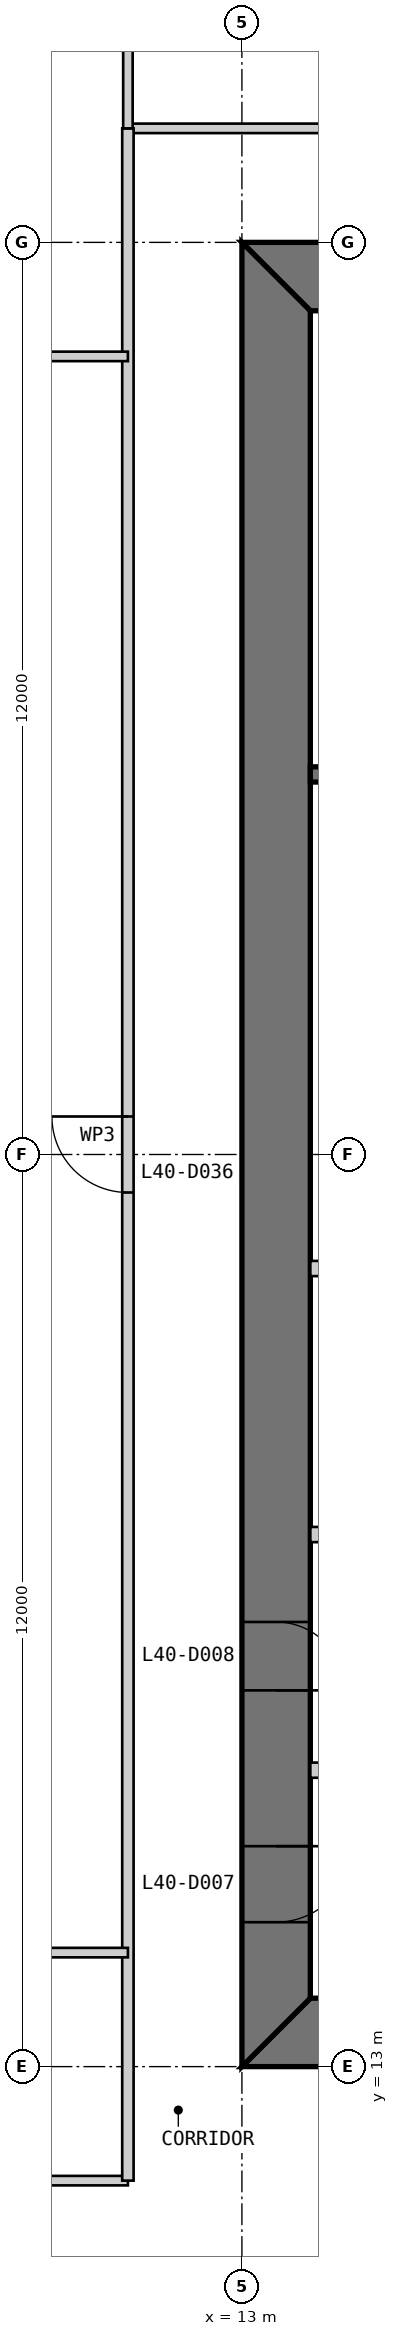
"""IFC4 building model, lengths in metres.
Left out: names, types, materials, properties, quantities, classifications, styles, units other than length and angle.
Written with IfcOpenShell. Run it as: python <this file> out.ifc"""

import sys

from ifc_helpers import new_model, si_unit, direction, frame, frame_2d, origin, place, context, subcontext, project, spatial, polyline, rectangle, outline, extrude, element, fill, save


model = new_model("IFC4")
c1 = context("Model", 3, precision=1e-05, world=origin(), true_north=direction((0.0, 1.0)))
c2 = subcontext(c1, "Body", "Model", "MODEL_VIEW")
j1 = project(units=[si_unit("LENGTHUNIT", "METRE"), si_unit("PLANEANGLEUNIT", "RADIAN")], contexts=[c1])
p1 = place(None, origin())
s1 = spatial("IfcSite", under=j1, at=p1, CompositionType="ELEMENT")
p2 = place(p1, origin())
s2 = spatial("IfcBuilding", under=s1, at=p2, CompositionType="ELEMENT")
p3 = place(p2, frame((0.0, 0.0, 173.8)))
s3 = spatial("IfcBuildingStorey", under=s2, at=p3, CompositionType="ELEMENT", Elevation=173.8)
p4 = place(p3, frame((13.0, 13.45, 0.0), z_axis=(0.0, 0.0, 1.0), x_axis=(1.0, 0.0, 0.0)))
e1 = element("IfcWall", 1, at=p4, inside=s3, PredefinedType="SHEAR", context=c2, shape_type="SweptSolid", body=[
    extrude(outline(polyline([(0.0, -0.45), (24.0, -0.45), (23.1, 0.45), (0.9, 0.45), (0.0, -0.45)])), origin(), (0.0, 0.0, 1.0), 4.0),
])
p5 = place(p4, frame((4.9, 0.0, 0.0)))
e2 = element("IfcOpeningElement", 2, at=p5, cuts=e1, PredefinedType="OPENING", context=c2, shape_type="SweptSolid", body=[
    extrude(rectangle(XDim=1.0, YDim=2.2, at=frame_2d((0.5, 1.1))), frame((0.0, 0.46, 0.0), z_axis=(0.0, -1.0, 0.0), x_axis=(1.0, 0.0, 0.0)), (0.0, 0.0, 1.0), 0.92),
])
p6 = place(p4, frame((8.9, 0.0, 0.0)))
e3 = element("IfcOpeningElement", 3, at=p6, cuts=e1, PredefinedType="OPENING", context=c2, shape_type="SweptSolid", body=[
    extrude(rectangle(XDim=1.1, YDim=2.2, at=frame_2d((0.55, 1.1))), frame((0.0, 0.46, 0.0), z_axis=(0.0, -1.0, 0.0), x_axis=(1.0, 0.0, 0.0)), (0.0, 0.0, 1.0), 0.92),
])
p7 = place(p4, frame((15.05, 0.0, 0.0)))
e4 = element("IfcOpeningElement", 4, at=p7, cuts=e1, PredefinedType="OPENING", context=c2, shape_type="SweptSolid", body=[
    extrude(rectangle(XDim=0.9, YDim=2.2, at=frame_2d((0.45, 1.1))), frame((0.0, 0.46, 0.0), z_axis=(0.0, -1.0, 0.0), x_axis=(1.0, 0.0, 0.0)), (0.0, 0.0, 1.0), 0.92),
])
p8 = place(p4, frame((17.9, 0.0, 0.0)))
e5 = element("IfcOpeningElement", 5, at=p8, cuts=e1, PredefinedType="OPENING", context=c2, shape_type="SweptSolid", body=[
    extrude(rectangle(XDim=1.0, YDim=2.2, at=frame_2d((0.5, 1.1))), frame((0.0, 0.46, 0.0), z_axis=(0.0, -1.0, 0.0), x_axis=(1.0, 0.0, 0.0)), (0.0, 0.0, 1.0), 0.92),
])
p9 = place(p4, frame((21.4, 0.0, 0.0)))
e6 = element("IfcOpeningElement", 6, at=p9, cuts=e1, PredefinedType="OPENING", context=c2, shape_type="SweptSolid", body=[
    extrude(rectangle(XDim=1.0, YDim=2.2, at=frame_2d((0.5, 1.1))), frame((0.0, 0.46, 0.0), z_axis=(0.0, -1.0, 0.0), x_axis=(1.0, 0.0, 0.0)), (0.0, 0.0, 1.0), 0.92),
])
p10 = place(p3, frame((37.0, 36.55, 0.0), z_axis=(0.0, 0.0, 1.0), x_axis=(-1.0, 0.0, 0.0)))
e7 = element("IfcWall", 7, at=p10, inside=s3, PredefinedType="SHEAR", context=c2, shape_type="SweptSolid", body=[
    extrude(outline(polyline([(0.0, -0.45), (24.0, -0.45), (23.1, 0.45), (0.9, 0.45), (0.0, -0.45)])), origin(), (0.0, 0.0, 1.0), 4.0),
])
p11 = place(p10, frame((4.9, 0.0, 0.0)))
e8 = element("IfcOpeningElement", 8, at=p11, cuts=e7, PredefinedType="OPENING", context=c2, shape_type="SweptSolid", body=[
    extrude(rectangle(XDim=1.0, YDim=2.2, at=frame_2d((0.5, 1.1))), frame((0.0, 0.46, 0.0), z_axis=(0.0, -1.0, 0.0), x_axis=(1.0, 0.0, 0.0)), (0.0, 0.0, 1.0), 0.92),
])
p12 = place(p10, frame((8.9, 0.0, 0.0)))
e9 = element("IfcOpeningElement", 9, at=p12, cuts=e7, PredefinedType="OPENING", context=c2, shape_type="SweptSolid", body=[
    extrude(rectangle(XDim=1.1, YDim=2.2, at=frame_2d((0.55, 1.1))), frame((0.0, 0.46, 0.0), z_axis=(0.0, -1.0, 0.0), x_axis=(1.0, 0.0, 0.0)), (0.0, 0.0, 1.0), 0.92),
])
p13 = place(p10, frame((15.05, 0.0, 0.0)))
e10 = element("IfcOpeningElement", 10, at=p13, cuts=e7, PredefinedType="OPENING", context=c2, shape_type="SweptSolid", body=[
    extrude(rectangle(XDim=0.9, YDim=2.2, at=frame_2d((0.45, 1.1))), frame((0.0, 0.46, 0.0), z_axis=(0.0, -1.0, 0.0), x_axis=(1.0, 0.0, 0.0)), (0.0, 0.0, 1.0), 0.92),
])
p14 = place(p10, frame((17.9, 0.0, 0.0)))
e11 = element("IfcOpeningElement", 11, at=p14, cuts=e7, PredefinedType="OPENING", context=c2, shape_type="SweptSolid", body=[
    extrude(rectangle(XDim=1.0, YDim=2.2, at=frame_2d((0.5, 1.1))), frame((0.0, 0.46, 0.0), z_axis=(0.0, -1.0, 0.0), x_axis=(1.0, 0.0, 0.0)), (0.0, 0.0, 1.0), 0.92),
])
p15 = place(p10, frame((21.4, 0.0, 0.0)))
e12 = element("IfcOpeningElement", 12, at=p15, cuts=e7, PredefinedType="OPENING", context=c2, shape_type="SweptSolid", body=[
    extrude(rectangle(XDim=1.0, YDim=2.2, at=frame_2d((0.5, 1.1))), frame((0.0, 0.46, 0.0), z_axis=(0.0, -1.0, 0.0), x_axis=(1.0, 0.0, 0.0)), (0.0, 0.0, 1.0), 0.92),
])
p16 = place(p3, frame((13.45, 36.1, 0.0), z_axis=(0.0, 0.0, 1.0), x_axis=(0.0, -1.0, 0.0)))
e13 = element("IfcWall", 13, at=p16, inside=s3, PredefinedType="SHEAR", context=c2, shape_type="SweptSolid", body=[
    extrude(outline(polyline([(-0.9, -0.45), (23.1, -0.45), (22.2, 0.45), (0.0, 0.45), (-0.9, -0.45)])), origin(), (0.0, 0.0, 1.0), 4.0),
])
p17 = place(p16, frame((20.2, 0.0, 0.0)))
e14 = element("IfcOpeningElement", 14, at=p17, cuts=e13, PredefinedType="OPENING", context=c2, shape_type="SweptSolid", body=[
    extrude(rectangle(XDim=1.0, YDim=2.2, at=frame_2d((0.5, 1.1))), frame((0.0, 0.46, 0.0), z_axis=(0.0, -1.0, 0.0), x_axis=(1.0, 0.0, 0.0)), (0.0, 0.0, 1.0), 0.92),
])
p18 = place(p16, frame((17.25, 0.0, 0.0)))
e15 = element("IfcOpeningElement", 15, at=p18, cuts=e13, PredefinedType="OPENING", context=c2, shape_type="SweptSolid", body=[
    extrude(rectangle(XDim=0.9, YDim=2.2, at=frame_2d((0.45, 1.1))), frame((0.0, 0.46, 0.0), z_axis=(0.0, -1.0, 0.0), x_axis=(1.0, 0.0, 0.0)), (0.0, 0.0, 1.0), 0.92),
])
for number, where, z_axis, x_axis in (
    (16, (13.9, 16.9, 0.0), (0.0, 0.0, 1.0), (1.0, 0.0, 0.0)),
    (17, (13.9, 20.0, 0.0), (0.0, 0.0, 1.0), (1.0, 0.0, 0.0)),
    (18, (13.9, 23.5, 0.0), (0.0, 0.0, 1.0), (1.0, 0.0, 0.0)),
):
    element("IfcWall", number, at=place(p3, frame(where, z_axis=z_axis, x_axis=x_axis)), inside=s3, PredefinedType="PARTITIONING", context=c2, shape_type="SweptSolid", body=[
        extrude(rectangle(XDim=2.8, YDim=0.2, at=frame_2d((1.4, 0.0))), origin(), (0.0, 0.0, 1.0), 3.8),
    ])
p19 = place(p3, frame((29.7, 30.0, 0.0), z_axis=(0.0, 0.0, 1.0), x_axis=(-1.0, 0.0, 0.0)))
e19 = element("IfcWall", 19, at=p19, inside=s3, PredefinedType="SOLIDWALL", context=c2, shape_type="SweptSolid", body=[
    extrude(rectangle(XDim=15.8, YDim=0.2, at=frame_2d((7.9, 0.0))), origin(), (0.0, 0.0, 1.0), 3.8),
])
p20 = place(p3, frame((0.15, 11.5, 0.0), z_axis=(0.0, 0.0, 1.0), x_axis=(1.0, 0.0, 0.0)))
e20 = element("IfcWall", 20, at=p20, inside=s3, PredefinedType="PARTITIONING", context=c2, shape_type="SweptSolid", body=[
    extrude(rectangle(XDim=11.35, YDim=0.125, at=frame_2d((5.675, 0.0))), origin(), (0.0, 0.0, 1.0), 3.85),
])
p21 = place(p3, frame((14.5, 38.5, 0.0), z_axis=(0.0, 0.0, 1.0), x_axis=(-1.0, 0.0, 0.0)))
e21 = element("IfcWall", 21, at=p21, inside=s3, PredefinedType="PARTITIONING", context=c2, shape_type="SweptSolid", body=[
    extrude(rectangle(XDim=3.0, YDim=0.125, at=frame_2d((1.5, 0.0))), origin(), (0.0, 0.0, 1.0), 3.85),
])
p22 = place(p3, frame((11.5, 38.5, 0.0), z_axis=(0.0, 0.0, 1.0), x_axis=(0.0, -1.0, 0.0)))
e22 = element("IfcWall", 22, at=p22, inside=s3, PredefinedType="PARTITIONING", context=c2, shape_type="SweptSolid", body=[
    extrude(rectangle(XDim=27.0, YDim=0.15, at=frame_2d((13.5, 0.0))), origin(), (0.0, 0.0, 1.0), 3.85),
])
p23 = place(p22, frame((13.0, 0.0, 0.0)))
e23 = element("IfcOpeningElement", 23, at=p23, cuts=e22, PredefinedType="OPENING", context=c2, shape_type="SweptSolid", body=[
    extrude(rectangle(XDim=1.0, YDim=2.2, at=frame_2d((0.5, 1.1))), frame((0.0, 0.085, 0.0), z_axis=(0.0, -1.0, 0.0), x_axis=(1.0, 0.0, 0.0)), (0.0, 0.0, 1.0), 0.17),
])
p24 = place(p3, frame((11.5, 49.85, 0.0), z_axis=(0.0, 0.0, 1.0), x_axis=(0.0, -1.0, 0.0)))
e24 = element("IfcWall", 24, at=p24, inside=s3, PredefinedType="PARTITIONING", context=c2, shape_type="SweptSolid", body=[
    extrude(rectangle(XDim=11.35, YDim=0.125, at=frame_2d((5.675, 0.0))), origin(), (0.0, 0.0, 1.0), 3.85),
])
p25 = place(p3, frame((0.15, 35.5, 0.0), z_axis=(0.0, 0.0, 1.0), x_axis=(1.0, 0.0, 0.0)))
e25 = element("IfcWall", 25, at=p25, inside=s3, PredefinedType="PARTITIONING", context=c2, shape_type="SweptSolid", body=[
    extrude(rectangle(XDim=11.35, YDim=0.125, at=frame_2d((5.675, 0.0))), origin(), (0.0, 0.0, 1.0), 3.85),
])
p26 = place(p25, frame((7.1, 0.0, 0.0)))
e26 = element("IfcOpeningElement", 26, at=p26, cuts=e25, PredefinedType="OPENING", context=c2, shape_type="SweptSolid", body=[
    extrude(rectangle(XDim=1.0, YDim=2.2, at=frame_2d((0.5, 1.1))), frame((0.0, 0.073, 0.0), z_axis=(0.0, -1.0, 0.0), x_axis=(1.0, 0.0, 0.0)), (0.0, 0.0, 1.0), 0.145),
])
p27 = place(p3, frame((4.0, 14.5, 0.0), z_axis=(0.0, 0.0, 1.0), x_axis=(1.0, 0.0, 0.0)))
e27 = element("IfcWall", 27, at=p27, inside=s3, PredefinedType="PARTITIONING", context=c2, shape_type="SweptSolid", body=[
    extrude(rectangle(XDim=7.5, YDim=0.125, at=frame_2d((3.75, 0.0))), origin(), (0.0, 0.0, 1.0), 3.85),
])
p28 = place(p27, frame((3.3, 0.0, 0.0)))
e28 = element("IfcOpeningElement", 28, at=p28, cuts=e27, PredefinedType="OPENING", context=c2, shape_type="SweptSolid", body=[
    extrude(rectangle(XDim=0.9, YDim=2.2, at=frame_2d((0.45, 1.1))), frame((0.0, 0.073, 0.0), z_axis=(0.0, -1.0, 0.0), x_axis=(1.0, 0.0, 0.0)), (0.0, 0.0, 1.0), 0.145),
])
p29 = place(p17, origin())
e29 = element("IfcDoor", 29, at=p29, inside=s3, OperationType="SINGLE_SWING_LEFT", PredefinedType="DOOR", context=c2, shape_type="SweptSolid", body=[
    extrude(rectangle(XDim=1.0, YDim=2.2, at=frame_2d((0.5, 1.1))), frame((0.0, 0.025, 0.0), z_axis=(0.0, -1.0, 0.0), x_axis=(1.0, 0.0, 0.0)), (0.0, 0.0, 1.0), 0.05),
    extrude(outline(polyline([(0.0, 0.0), (0.04, 0.0), (0.04, 2.16), (0.96, 2.16), (0.96, 0.0), (1.0, 0.0), (1.0, 2.2), (0.0, 2.2), (0.0, 0.0)])), frame((0.0, 0.3, 0.0), z_axis=(0.0, -1.0, 0.0), x_axis=(1.0, 0.0, 0.0)), (0.0, 0.0, 1.0), 0.6),
])
fill(e14, e29)
p30 = place(p18, origin())
e30 = element("IfcDoor", 30, at=p30, inside=s3, OperationType="SINGLE_SWING_RIGHT", PredefinedType="DOOR", context=c2, shape_type="SweptSolid", body=[
    extrude(rectangle(XDim=0.9, YDim=2.2, at=frame_2d((0.45, 1.1))), frame((0.0, 0.025, 0.0), z_axis=(0.0, -1.0, 0.0), x_axis=(1.0, 0.0, 0.0)), (0.0, 0.0, 1.0), 0.05),
    extrude(outline(polyline([(0.0, 0.0), (0.04, 0.0), (0.04, 2.16), (0.86, 2.16), (0.86, 0.0), (0.9, 0.0), (0.9, 2.2), (0.0, 2.2), (0.0, 0.0)])), frame((0.0, 0.3, 0.0), z_axis=(0.0, -1.0, 0.0), x_axis=(1.0, 0.0, 0.0)), (0.0, 0.0, 1.0), 0.6),
])
fill(e15, e30)
p31 = place(p23, frame((1.0, 0.0, 0.0), z_axis=(0.0, 0.0, 1.0), x_axis=(-1.0, 0.0, 0.0)))
e31 = element("IfcDoor", 31, at=p31, inside=s3, OperationType="SINGLE_SWING_RIGHT", PredefinedType="DOOR", context=c2, shape_type="SweptSolid", body=[
    extrude(rectangle(XDim=1.0, YDim=2.2, at=frame_2d((0.5, 1.1))), frame((0.0, 0.025, 0.0), z_axis=(0.0, -1.0, 0.0), x_axis=(1.0, 0.0, 0.0)), (0.0, 0.0, 1.0), 0.05),
])
fill(e23, e31)
save(model, sys.argv[1])
